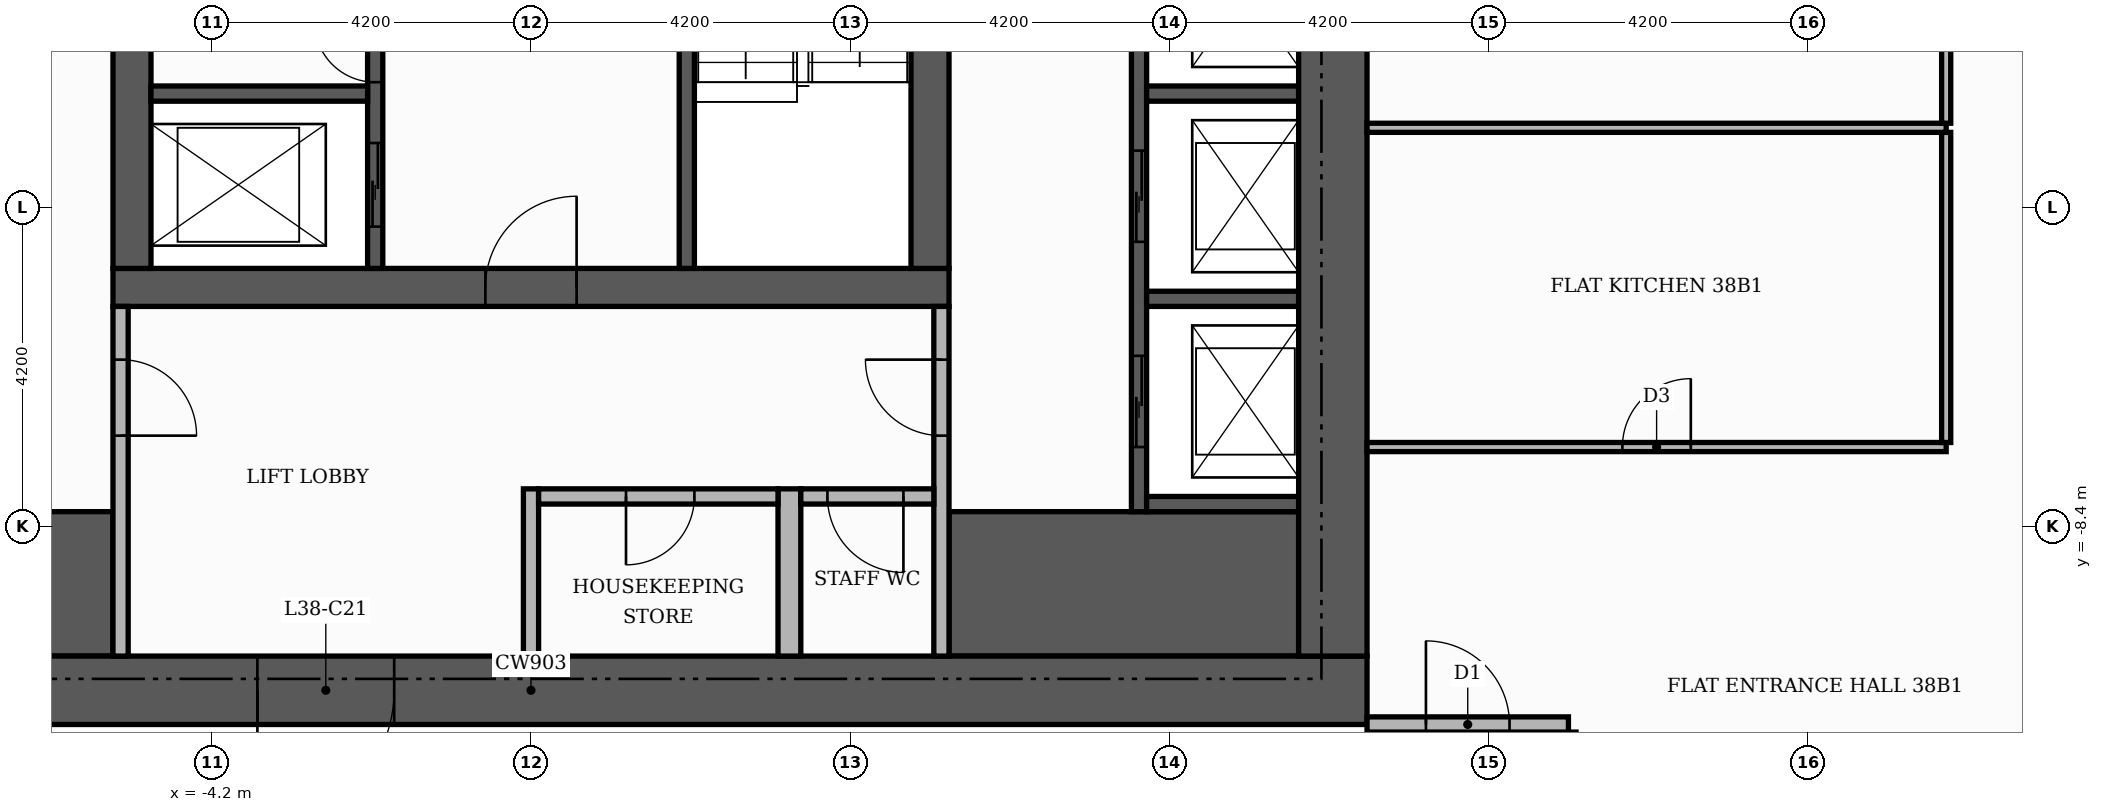
"""IFC4 building model, lengths in metres.
Left out: names, types, materials, properties, quantities, classifications, styles, units other than length and angle.
Written with IfcOpenShell. Run it as: python <this file> out.ifc"""

import sys

from ifc_helpers import new_model, si_unit, direction, frame, frame_2d, origin, place, context, subcontext, project, spatial, rectangle, extrude, element, fill, save


model = new_model("IFC4")
c1 = context("Model", 3, precision=1e-05, world=origin(), true_north=direction((0.0, 1.0)))
c2 = subcontext(c1, "Body", "Model", "MODEL_VIEW")
j1 = project(units=[si_unit("LENGTHUNIT", "METRE"), si_unit("PLANEANGLEUNIT", "RADIAN")], contexts=[c1])
p1 = place(None, origin())
s1 = spatial("IfcSite", under=j1, at=p1, CompositionType="ELEMENT")
p2 = place(p1, origin())
s2 = spatial("IfcBuilding", under=s1, at=p2, CompositionType="ELEMENT")
p3 = place(p2, frame((0.0, 0.0, 161.1)))
s3 = spatial("IfcBuildingStorey", under=s2, at=p3, CompositionType="ELEMENT", Elevation=161.1)
p4 = place(p3, frame((-5.5, -5.25, 0.0), z_axis=(0.0, 0.0, 1.0), x_axis=(1.0, 0.0, 0.0)))
e1 = element("IfcWall", 1, at=p4, inside=s3, PredefinedType="SHEAR", context=c2, shape_type="SweptSolid", body=[
    extrude(rectangle(XDim=11.0, YDim=0.5, at=frame_2d((5.5, 0.0))), origin(), (0.0, 0.0, 1.0), 3.48),
])
p5 = place(p4, frame((4.9, 0.0, 0.0)))
e2 = element("IfcOpeningElement", 2, at=p5, cuts=e1, PredefinedType="OPENING", context=c2, shape_type="SweptSolid", body=[
    extrude(rectangle(XDim=1.2, YDim=2.1, at=frame_2d((0.6, 1.05))), frame((0.0, 0.26, 0.0), z_axis=(0.0, -1.0, 0.0), x_axis=(1.0, 0.0, 0.0)), (0.0, 0.0, 1.0), 0.52),
])
for number, where, z_axis, x_axis in (
    (3, (-5.25, -5.0, 0.0), (0.0, 0.0, 1.0), (0.0, 1.0, 0.0)),
    (4, (5.25, -5.0, 0.0), (0.0, 0.0, 1.0), (0.0, 1.0, 0.0)),
):
    element("IfcWall", number, at=place(p3, frame(where, z_axis=z_axis, x_axis=x_axis)), inside=s3, PredefinedType="SHEAR", context=c2, shape_type="SweptSolid", body=[
        extrude(rectangle(XDim=10.5, YDim=0.5, at=frame_2d((5.25, 0.0))), origin(), (0.0, 0.0, 1.0), 3.48),
    ])
for number, where, z_axis, x_axis in (
    (5, (-10.1, -9.15, 0.0), (0.0, 0.0, 1.0), (1.0, 0.0, 0.0)),
    (6, (5.5, -9.15, 0.0), (0.0, 0.0, 1.0), (1.0, 0.0, 0.0)),
):
    element("IfcWall", number, at=place(p3, frame(where, z_axis=z_axis, x_axis=x_axis)), inside=s3, PredefinedType="SHEAR", context=c2, shape_type="SweptSolid", body=[
        extrude(rectangle(XDim=4.6, YDim=1.9, at=frame_2d((2.3, 0.0))), origin(), (0.0, 0.0, 1.0), 3.48),
    ])
p6 = place(p3, frame((2.05, -5.0, 0.0), z_axis=(0.0, 0.0, 1.0), x_axis=(0.0, 1.0, 0.0)))
e7 = element("IfcWall", 7, at=p6, inside=s3, PredefinedType="SHEAR", context=c2, shape_type="SweptSolid", body=[
    extrude(rectangle(XDim=6.6, YDim=0.2, at=frame_2d((3.3, 0.0))), origin(), (0.0, 0.0, 1.0), 3.48),
])
p7 = place(p6, frame((5.25, 0.0, 0.0)))
e8 = element("IfcOpeningElement", 8, at=p7, cuts=e7, PredefinedType="OPENING", context=c2, shape_type="SweptSolid", body=[
    extrude(rectangle(XDim=1.0, YDim=2.1, at=frame_2d((0.5, 1.05))), frame((0.0, 0.11, 0.0), z_axis=(0.0, -1.0, 0.0), x_axis=(1.0, 0.0, 0.0)), (0.0, 0.0, 1.0), 0.22),
])
p8 = place(p3, frame((8.0, -8.2, 0.0), z_axis=(0.0, 0.0, 1.0), x_axis=(0.0, 1.0, 0.0)))
e9 = element("IfcWall", 9, at=p8, inside=s3, PredefinedType="SHEAR", context=c2, shape_type="SweptSolid", body=[
    extrude(rectangle(XDim=16.4, YDim=0.2, at=frame_2d((8.2, 0.0))), origin(), (0.0, 0.0, 1.0), 3.48),
])
p9 = place(p8, frame((0.85, 0.0, 0.0)))
e10 = element("IfcOpeningElement", 10, at=p9, cuts=e9, PredefinedType="OPENING", context=c2, shape_type="SweptSolid", body=[
    extrude(rectangle(XDim=1.2, YDim=2.1, at=frame_2d((0.6, 1.05))), frame((0.0, 0.11, 0.0), z_axis=(0.0, -1.0, 0.0), x_axis=(1.0, 0.0, 0.0)), (0.0, 0.0, 1.0), 0.22),
])
p10 = place(p8, frame((3.55, 0.0, 0.0)))
e11 = element("IfcOpeningElement", 11, at=p10, cuts=e9, PredefinedType="OPENING", context=c2, shape_type="SweptSolid", body=[
    extrude(rectangle(XDim=1.2, YDim=2.1, at=frame_2d((0.6, 1.05))), frame((0.0, 0.11, 0.0), z_axis=(0.0, -1.0, 0.0), x_axis=(1.0, 0.0, 0.0)), (0.0, 0.0, 1.0), 0.22),
])
p11 = place(p8, frame((6.25, 0.0, 0.0)))
e12 = element("IfcOpeningElement", 12, at=p11, cuts=e9, PredefinedType="OPENING", context=c2, shape_type="SweptSolid", body=[
    extrude(rectangle(XDim=1.2, YDim=2.1, at=frame_2d((0.6, 1.05))), frame((0.0, 0.11, 0.0), z_axis=(0.0, -1.0, 0.0), x_axis=(1.0, 0.0, 0.0)), (0.0, 0.0, 1.0), 0.22),
])
p12 = place(p8, frame((8.95, 0.0, 0.0)))
e13 = element("IfcOpeningElement", 13, at=p12, cuts=e9, PredefinedType="OPENING", context=c2, shape_type="SweptSolid", body=[
    extrude(rectangle(XDim=1.2, YDim=2.1, at=frame_2d((0.6, 1.05))), frame((0.0, 0.11, 0.0), z_axis=(0.0, -1.0, 0.0), x_axis=(1.0, 0.0, 0.0)), (0.0, 0.0, 1.0), 0.22),
])
p13 = place(p8, frame((11.65, 0.0, 0.0)))
e14 = element("IfcOpeningElement", 14, at=p13, cuts=e9, PredefinedType="OPENING", context=c2, shape_type="SweptSolid", body=[
    extrude(rectangle(XDim=1.2, YDim=2.1, at=frame_2d((0.6, 1.05))), frame((0.0, 0.11, 0.0), z_axis=(0.0, -1.0, 0.0), x_axis=(1.0, 0.0, 0.0)), (0.0, 0.0, 1.0), 0.22),
])
p14 = place(p8, frame((14.35, 0.0, 0.0)))
e15 = element("IfcOpeningElement", 15, at=p14, cuts=e9, PredefinedType="OPENING", context=c2, shape_type="SweptSolid", body=[
    extrude(rectangle(XDim=1.2, YDim=2.1, at=frame_2d((0.6, 1.05))), frame((0.0, 0.11, 0.0), z_axis=(0.0, -1.0, 0.0), x_axis=(1.0, 0.0, 0.0)), (0.0, 0.0, 1.0), 0.22),
])
for number, where, z_axis, x_axis in (
    (16, (8.1, -8.1, 0.0), (0.0, 0.0, 1.0), (1.0, 0.0, 0.0)),
    (17, (8.1, -5.4, 0.0), (0.0, 0.0, 1.0), (1.0, 0.0, 0.0)),
):
    element("IfcWall", number, at=place(p3, frame(where, z_axis=z_axis, x_axis=x_axis)), inside=s3, PredefinedType="SHEAR", context=c2, shape_type="SweptSolid", body=[
        extrude(rectangle(XDim=2.0, YDim=0.2, at=frame_2d((1.0, 0.0))), origin(), (0.0, 0.0, 1.0), 3.48),
    ])
p15 = place(p3, frame((-2.05, -5.0, 0.0), z_axis=(0.0, 0.0, 1.0), x_axis=(0.0, 1.0, 0.0)))
e18 = element("IfcWall", 18, at=p15, inside=s3, PredefinedType="SHEAR", context=c2, shape_type="SweptSolid", body=[
    extrude(rectangle(XDim=3.4, YDim=0.2, at=frame_2d((1.7, 0.0))), origin(), (0.0, 0.0, 1.0), 3.48),
])
p16 = place(p15, frame((0.55, 0.0, 0.0)))
e19 = element("IfcOpeningElement", 19, at=p16, cuts=e18, PredefinedType="OPENING", context=c2, shape_type="SweptSolid", body=[
    extrude(rectangle(XDim=1.1, YDim=2.1, at=frame_2d((0.55, 1.05))), frame((0.0, 0.11, 0.0), z_axis=(0.0, -1.0, 0.0), x_axis=(1.0, 0.0, 0.0)), (0.0, 0.0, 1.0), 0.22),
])
p17 = place(p15, frame((2.45, 0.0, 0.0)))
e20 = element("IfcOpeningElement", 20, at=p17, cuts=e18, PredefinedType="OPENING", context=c2, shape_type="SweptSolid", body=[
    extrude(rectangle(XDim=0.8, YDim=2.1, at=frame_2d((0.4, 1.05))), frame((0.0, 0.11, 0.0), z_axis=(0.0, -1.0, 0.0), x_axis=(1.0, 0.0, 0.0)), (0.0, 0.0, 1.0), 0.22),
])
p18 = place(p3, frame((-5.0, -2.7, 0.0), z_axis=(0.0, 0.0, 1.0), x_axis=(1.0, 0.0, 0.0)))
e21 = element("IfcWall", 21, at=p18, inside=s3, PredefinedType="SHEAR", context=c2, shape_type="SweptSolid", body=[
    extrude(rectangle(XDim=2.85, YDim=0.2, at=frame_2d((1.425, 0.0))), origin(), (0.0, 0.0, 1.0), 3.48),
])
p19 = place(p3, frame((8.1, -2.7, 0.0), z_axis=(0.0, 0.0, 1.0), x_axis=(1.0, 0.0, 0.0)))
e22 = element("IfcWall", 22, at=p19, inside=s3, PredefinedType="SHEAR", context=c2, shape_type="SweptSolid", body=[
    extrude(rectangle(XDim=2.0, YDim=0.2, at=frame_2d((1.0, 0.0))), origin(), (0.0, 0.0, 1.0), 3.48),
])
p20 = place(p3, frame((-11.0, -10.55, 0.0), z_axis=(0.0, 0.0, 1.0), x_axis=(1.0, 0.0, 0.0)))
e23 = element("IfcWall", 23, at=p20, inside=s3, PredefinedType="SHEAR", context=c2, shape_type="SweptSolid", body=[
    extrude(rectangle(XDim=22.0, YDim=0.9, at=frame_2d((11.0, 0.0))), origin(), (0.0, 0.0, 1.0), 3.48),
])
p21 = place(p20, frame((7.4, 0.0, 0.0)))
e24 = element("IfcOpeningElement", 24, at=p21, cuts=e23, PredefinedType="OPENING", context=c2, shape_type="SweptSolid", body=[
    extrude(rectangle(XDim=1.8, YDim=2.2, at=frame_2d((0.9, 1.1))), frame((0.0, 0.46, 0.0), z_axis=(0.0, -1.0, 0.0), x_axis=(1.0, 0.0, 0.0)), (0.0, 0.0, 1.0), 0.92),
])
p22 = place(p3, frame((10.55, -10.1, 0.0), z_axis=(0.0, 0.0, 1.0), x_axis=(0.0, 1.0, 0.0)))
e25 = element("IfcWall", 25, at=p22, inside=s3, PredefinedType="SHEAR", context=c2, shape_type="SweptSolid", body=[
    extrude(rectangle(XDim=20.2, YDim=0.9, at=frame_2d((10.1, 0.0))), origin(), (0.0, 0.0, 1.0), 3.48),
])
p23 = place(p3, frame((-5.4, -10.1, 0.0), z_axis=(0.0, 0.0, 1.0), x_axis=(0.0, 1.0, 0.0)))
e26 = element("IfcWall", 26, at=p23, inside=s3, PredefinedType="PARTITIONING", context=c2, shape_type="SweptSolid", body=[
    extrude(rectangle(XDim=4.6, YDim=0.2, at=frame_2d((2.3, 0.0))), origin(), (0.0, 0.0, 1.0), 3.48),
])
p24 = place(p23, frame((2.9, 0.0, 0.0)))
e27 = element("IfcOpeningElement", 27, at=p24, cuts=e26, PredefinedType="OPENING", context=c2, shape_type="SweptSolid", body=[
    extrude(rectangle(XDim=1.0, YDim=2.1, at=frame_2d((0.5, 1.05))), frame((0.0, 0.11, 0.0), z_axis=(0.0, -1.0, 0.0), x_axis=(1.0, 0.0, 0.0)), (0.0, 0.0, 1.0), 0.22),
])
p25 = place(p3, frame((0.0, -10.1, 0.0), z_axis=(0.0, 0.0, 1.0), x_axis=(0.0, 1.0, 0.0)))
e28 = element("IfcWall", 28, at=p25, inside=s3, PredefinedType="PARTITIONING", context=c2, shape_type="SweptSolid", body=[
    extrude(rectangle(XDim=2.2, YDim=0.2, at=frame_2d((1.1, 0.0))), origin(), (0.0, 0.0, 1.0), 3.48),
])
p26 = place(p3, frame((3.4, -10.1, 0.0), z_axis=(0.0, 0.0, 1.0), x_axis=(0.0, 1.0, 0.0)))
e29 = element("IfcWall", 29, at=p26, inside=s3, PredefinedType="PARTITIONING", context=c2, shape_type="SweptSolid", body=[
    extrude(rectangle(XDim=2.2, YDim=0.3, at=frame_2d((1.1, 0.0))), origin(), (0.0, 0.0, 1.0), 3.48),
])
p27 = place(p3, frame((5.4, -10.1, 0.0), z_axis=(0.0, 0.0, 1.0), x_axis=(0.0, 1.0, 0.0)))
e30 = element("IfcWall", 30, at=p27, inside=s3, PredefinedType="PARTITIONING", context=c2, shape_type="SweptSolid", body=[
    extrude(rectangle(XDim=4.6, YDim=0.2, at=frame_2d((2.3, 0.0))), origin(), (0.0, 0.0, 1.0), 3.48),
])
p28 = place(p27, frame((2.9, 0.0, 0.0)))
e31 = element("IfcOpeningElement", 31, at=p28, cuts=e30, PredefinedType="OPENING", context=c2, shape_type="SweptSolid", body=[
    extrude(rectangle(XDim=1.0, YDim=2.1, at=frame_2d((0.5, 1.05))), frame((0.0, 0.11, 0.0), z_axis=(0.0, -1.0, 0.0), x_axis=(1.0, 0.0, 0.0)), (0.0, 0.0, 1.0), 0.22),
])
p29 = place(p3, frame((0.1, -8.0, 0.0), z_axis=(0.0, 0.0, 1.0), x_axis=(1.0, 0.0, 0.0)))
e32 = element("IfcWall", 32, at=p29, inside=s3, PredefinedType="PARTITIONING", context=c2, shape_type="SweptSolid", body=[
    extrude(rectangle(XDim=3.15, YDim=0.2, at=frame_2d((1.575, 0.0))), origin(), (0.0, 0.0, 1.0), 3.48),
])
p30 = place(p29, frame((1.15, 0.0, 0.0)))
e33 = element("IfcOpeningElement", 33, at=p30, cuts=e32, PredefinedType="OPENING", context=c2, shape_type="SweptSolid", body=[
    extrude(rectangle(XDim=0.9, YDim=2.1, at=frame_2d((0.45, 1.05))), frame((0.0, 0.11, 0.0), z_axis=(0.0, -1.0, 0.0), x_axis=(1.0, 0.0, 0.0)), (0.0, 0.0, 1.0), 0.22),
])
p31 = place(p3, frame((3.55, -8.0, 0.0), z_axis=(0.0, 0.0, 1.0), x_axis=(1.0, 0.0, 0.0)))
e34 = element("IfcWall", 34, at=p31, inside=s3, PredefinedType="PARTITIONING", context=c2, shape_type="SweptSolid", body=[
    extrude(rectangle(XDim=1.75, YDim=0.2, at=frame_2d((0.875, 0.0))), origin(), (0.0, 0.0, 1.0), 3.48),
])
p32 = place(p31, frame((0.35, 0.0, 0.0)))
e35 = element("IfcOpeningElement", 35, at=p32, cuts=e34, PredefinedType="OPENING", context=c2, shape_type="SweptSolid", body=[
    extrude(rectangle(XDim=1.0, YDim=2.1, at=frame_2d((0.5, 1.05))), frame((0.0, 0.11, 0.0), z_axis=(0.0, -1.0, 0.0), x_axis=(1.0, 0.0, 0.0)), (0.0, 0.0, 1.0), 0.22),
])
p33 = place(p3, frame((13.65, -13.55, 0.0), z_axis=(0.0, 0.0, 1.0), x_axis=(0.0, 1.0, 0.0)))
e36 = element("IfcWall", 36, at=p33, inside=s3, PredefinedType="PARTITIONING", context=c2, shape_type="SweptSolid", body=[
    extrude(rectangle(XDim=2.45, YDim=0.2, at=frame_2d((1.225, 0.0))), origin(), (0.0, 0.0, 1.0), 3.48),
])
p34 = place(p3, frame((11.0, -11.0, 0.0), z_axis=(0.0, 0.0, 1.0), x_axis=(1.0, 0.0, 0.0)))
e37 = element("IfcWall", 37, at=p34, inside=s3, PredefinedType="PARTITIONING", context=c2, shape_type="SweptSolid", body=[
    extrude(rectangle(XDim=2.65, YDim=0.2, at=frame_2d((1.325, 0.0))), origin(), (0.0, 0.0, 1.0), 3.48),
])
p35 = place(p34, frame((0.775, 0.0, 0.0)))
e38 = element("IfcOpeningElement", 38, at=p35, cuts=e37, PredefinedType="OPENING", context=c2, shape_type="SweptSolid", body=[
    extrude(rectangle(XDim=1.1, YDim=2.4, at=frame_2d((0.55, 1.2))), frame((0.0, 0.11, 0.0), z_axis=(0.0, -1.0, 0.0), x_axis=(1.0, 0.0, 0.0)), (0.0, 0.0, 1.0), 0.22),
])
p36 = place(p3, frame((11.0, -7.35, 0.0), z_axis=(0.0, 0.0, 1.0), x_axis=(1.0, 0.0, 0.0)))
e39 = element("IfcWall", 39, at=p36, inside=s3, PredefinedType="PARTITIONING", context=c2, shape_type="SweptSolid", body=[
    extrude(rectangle(XDim=7.62, YDim=0.12, at=frame_2d((3.81, 0.0))), origin(), (0.0, 0.0, 1.0), 3.48),
])
p37 = place(p36, frame((3.36, 0.0, 0.0)))
e40 = element("IfcOpeningElement", 40, at=p37, cuts=e39, PredefinedType="OPENING", context=c2, shape_type="SweptSolid", body=[
    extrude(rectangle(XDim=0.9, YDim=2.1, at=frame_2d((0.45, 1.05))), frame((0.0, 0.07, 0.0), z_axis=(0.0, -1.0, 0.0), x_axis=(1.0, 0.0, 0.0)), (0.0, 0.0, 1.0), 0.14),
])
p38 = place(p3, frame((18.62, -7.29, 0.0), z_axis=(0.0, 0.0, 1.0), x_axis=(0.0, 1.0, 0.0)))
e41 = element("IfcWall", 41, at=p38, inside=s3, PredefinedType="PARTITIONING", context=c2, shape_type="SweptSolid", body=[
    extrude(rectangle(XDim=4.08, YDim=0.12, at=frame_2d((2.04, 0.0))), origin(), (0.0, 0.0, 1.0), 3.48),
])
p39 = place(p3, frame((11.0, -3.15, 0.0), z_axis=(0.0, 0.0, 1.0), x_axis=(1.0, 0.0, 0.0)))
e42 = element("IfcWall", 42, at=p39, inside=s3, PredefinedType="PARTITIONING", context=c2, shape_type="SweptSolid", body=[
    extrude(rectangle(XDim=7.62, YDim=0.12, at=frame_2d((3.81, 0.0))), origin(), (0.0, 0.0, 1.0), 3.48),
])
p40 = place(p3, frame((18.62, -3.09, 0.0), z_axis=(0.0, 0.0, 1.0), x_axis=(0.0, 1.0, 0.0)))
e43 = element("IfcWall", 43, at=p40, inside=s3, PredefinedType="PARTITIONING", context=c2, shape_type="SweptSolid", body=[
    extrude(rectangle(XDim=4.08, YDim=0.12, at=frame_2d((2.04, 0.0))), origin(), (0.0, 0.0, 1.0), 3.48),
])
p41 = place(p40, frame((1.59, 0.0, 0.0)))
e44 = element("IfcOpeningElement", 44, at=p41, cuts=e43, PredefinedType="OPENING", context=c2, shape_type="SweptSolid", body=[
    extrude(rectangle(XDim=0.9, YDim=2.1, at=frame_2d((0.45, 1.05))), frame((0.0, 0.07, 0.0), z_axis=(0.0, -1.0, 0.0), x_axis=(1.0, 0.0, 0.0)), (0.0, 0.0, 1.0), 0.14),
])
p42 = place(p9, origin())
e45 = element("IfcDoor", 45, at=p42, inside=s3, OperationType="SLIDING_TO_LEFT", PredefinedType="DOOR", context=c2, shape_type="SweptSolid", body=[
    extrude(rectangle(XDim=1.2, YDim=2.1, at=frame_2d((0.6, 1.05))), frame((0.0, 0.025, 0.0), z_axis=(0.0, -1.0, 0.0), x_axis=(1.0, 0.0, 0.0)), (0.0, 0.0, 1.0), 0.05),
])
fill(e10, e45)
p43 = place(p10, origin())
e46 = element("IfcDoor", 46, at=p43, inside=s3, OperationType="SLIDING_TO_LEFT", PredefinedType="DOOR", context=c2, shape_type="SweptSolid", body=[
    extrude(rectangle(XDim=1.2, YDim=2.1, at=frame_2d((0.6, 1.05))), frame((0.0, 0.025, 0.0), z_axis=(0.0, -1.0, 0.0), x_axis=(1.0, 0.0, 0.0)), (0.0, 0.0, 1.0), 0.05),
])
fill(e11, e46)
p44 = place(p16, origin())
e47 = element("IfcDoor", 47, at=p44, inside=s3, OperationType="SLIDING_TO_LEFT", PredefinedType="DOOR", context=c2, shape_type="SweptSolid", body=[
    extrude(rectangle(XDim=1.1, YDim=2.1, at=frame_2d((0.55, 1.05))), frame((0.0, 0.025, 0.0), z_axis=(0.0, -1.0, 0.0), x_axis=(1.0, 0.0, 0.0)), (0.0, 0.0, 1.0), 0.05),
])
fill(e19, e47)
p45 = place(p17, origin())
e48 = element("IfcDoor", 48, at=p45, inside=s3, OperationType="SINGLE_SWING_RIGHT", PredefinedType="DOOR", context=c2, shape_type="SweptSolid", body=[
    extrude(rectangle(XDim=0.8, YDim=2.1, at=frame_2d((0.4, 1.05))), frame((0.0, 0.025, 0.0), z_axis=(0.0, -1.0, 0.0), x_axis=(1.0, 0.0, 0.0)), (0.0, 0.0, 1.0), 0.05),
])
fill(e20, e48)
p46 = place(p5, origin())
e49 = element("IfcDoor", 49, at=p46, inside=s3, OperationType="SINGLE_SWING_RIGHT", PredefinedType="DOOR", context=c2, shape_type="SweptSolid", body=[
    extrude(rectangle(XDim=1.2, YDim=2.1, at=frame_2d((0.6, 1.05))), frame((0.0, 0.025, 0.0), z_axis=(0.0, -1.0, 0.0), x_axis=(1.0, 0.0, 0.0)), (0.0, 0.0, 1.0), 0.05),
])
fill(e2, e49)
p47 = place(p24, frame((1.0, 0.0, 0.0), z_axis=(0.0, 0.0, 1.0), x_axis=(-1.0, 0.0, 0.0)))
e50 = element("IfcDoor", 50, at=p47, inside=s3, OperationType="SINGLE_SWING_LEFT", PredefinedType="DOOR", context=c2, shape_type="SweptSolid", body=[
    extrude(rectangle(XDim=1.0, YDim=2.1, at=frame_2d((0.5, 1.05))), frame((0.0, 0.025, 0.0), z_axis=(0.0, -1.0, 0.0), x_axis=(1.0, 0.0, 0.0)), (0.0, 0.0, 1.0), 0.05),
])
fill(e27, e50)
p48 = place(p28, origin())
e51 = element("IfcDoor", 51, at=p48, inside=s3, OperationType="SINGLE_SWING_RIGHT", PredefinedType="DOOR", context=c2, shape_type="SweptSolid", body=[
    extrude(rectangle(XDim=1.0, YDim=2.1, at=frame_2d((0.5, 1.05))), frame((0.0, 0.025, 0.0), z_axis=(0.0, -1.0, 0.0), x_axis=(1.0, 0.0, 0.0)), (0.0, 0.0, 1.0), 0.05),
])
fill(e31, e51)
p49 = place(p21, frame((1.8, 0.0, 0.0), z_axis=(0.0, 0.0, 1.0), x_axis=(-1.0, 0.0, 0.0)))
e52 = element("IfcDoor", 52, at=p49, inside=s3, OperationType="DOUBLE_DOOR_SINGLE_SWING", PredefinedType="DOOR", context=c2, shape_type="SweptSolid", body=[
    extrude(rectangle(XDim=1.8, YDim=2.2, at=frame_2d((0.9, 1.1))), frame((0.0, 0.025, 0.0), z_axis=(0.0, -1.0, 0.0), x_axis=(1.0, 0.0, 0.0)), (0.0, 0.0, 1.0), 0.05),
])
fill(e24, e52)
p50 = place(p30, frame((0.9, 0.0, 0.0), z_axis=(0.0, 0.0, 1.0), x_axis=(-1.0, 0.0, 0.0)))
e53 = element("IfcDoor", 53, at=p50, inside=s3, OperationType="SINGLE_SWING_LEFT", PredefinedType="DOOR", context=c2, shape_type="SweptSolid", body=[
    extrude(rectangle(XDim=0.9, YDim=2.1, at=frame_2d((0.45, 1.05))), frame((0.0, 0.025, 0.0), z_axis=(0.0, -1.0, 0.0), x_axis=(1.0, 0.0, 0.0)), (0.0, 0.0, 1.0), 0.05),
])
fill(e33, e53)
p51 = place(p32, frame((1.0, 0.0, 0.0), z_axis=(0.0, 0.0, 1.0), x_axis=(-1.0, 0.0, 0.0)))
e54 = element("IfcDoor", 54, at=p51, inside=s3, OperationType="SINGLE_SWING_RIGHT", PredefinedType="DOOR", context=c2, shape_type="SweptSolid", body=[
    extrude(rectangle(XDim=1.0, YDim=2.1, at=frame_2d((0.5, 1.05))), frame((0.0, 0.025, 0.0), z_axis=(0.0, -1.0, 0.0), x_axis=(1.0, 0.0, 0.0)), (0.0, 0.0, 1.0), 0.05),
])
fill(e35, e54)
p52 = place(p35, origin())
e55 = element("IfcDoor", 55, at=p52, inside=s3, OperationType="SINGLE_SWING_LEFT", PredefinedType="DOOR", context=c2, shape_type="SweptSolid", body=[
    extrude(rectangle(XDim=1.1, YDim=2.4, at=frame_2d((0.55, 1.2))), frame((0.0, 0.025, 0.0), z_axis=(0.0, -1.0, 0.0), x_axis=(1.0, 0.0, 0.0)), (0.0, 0.0, 1.0), 0.05),
])
fill(e38, e55)
p53 = place(p37, origin())
e56 = element("IfcDoor", 56, at=p53, inside=s3, OperationType="SINGLE_SWING_RIGHT", PredefinedType="DOOR", context=c2, shape_type="SweptSolid", body=[
    extrude(rectangle(XDim=0.9, YDim=2.1, at=frame_2d((0.45, 1.05))), frame((0.0, 0.025, 0.0), z_axis=(0.0, -1.0, 0.0), x_axis=(1.0, 0.0, 0.0)), (0.0, 0.0, 1.0), 0.05),
])
fill(e40, e56)
save(model, sys.argv[1])
